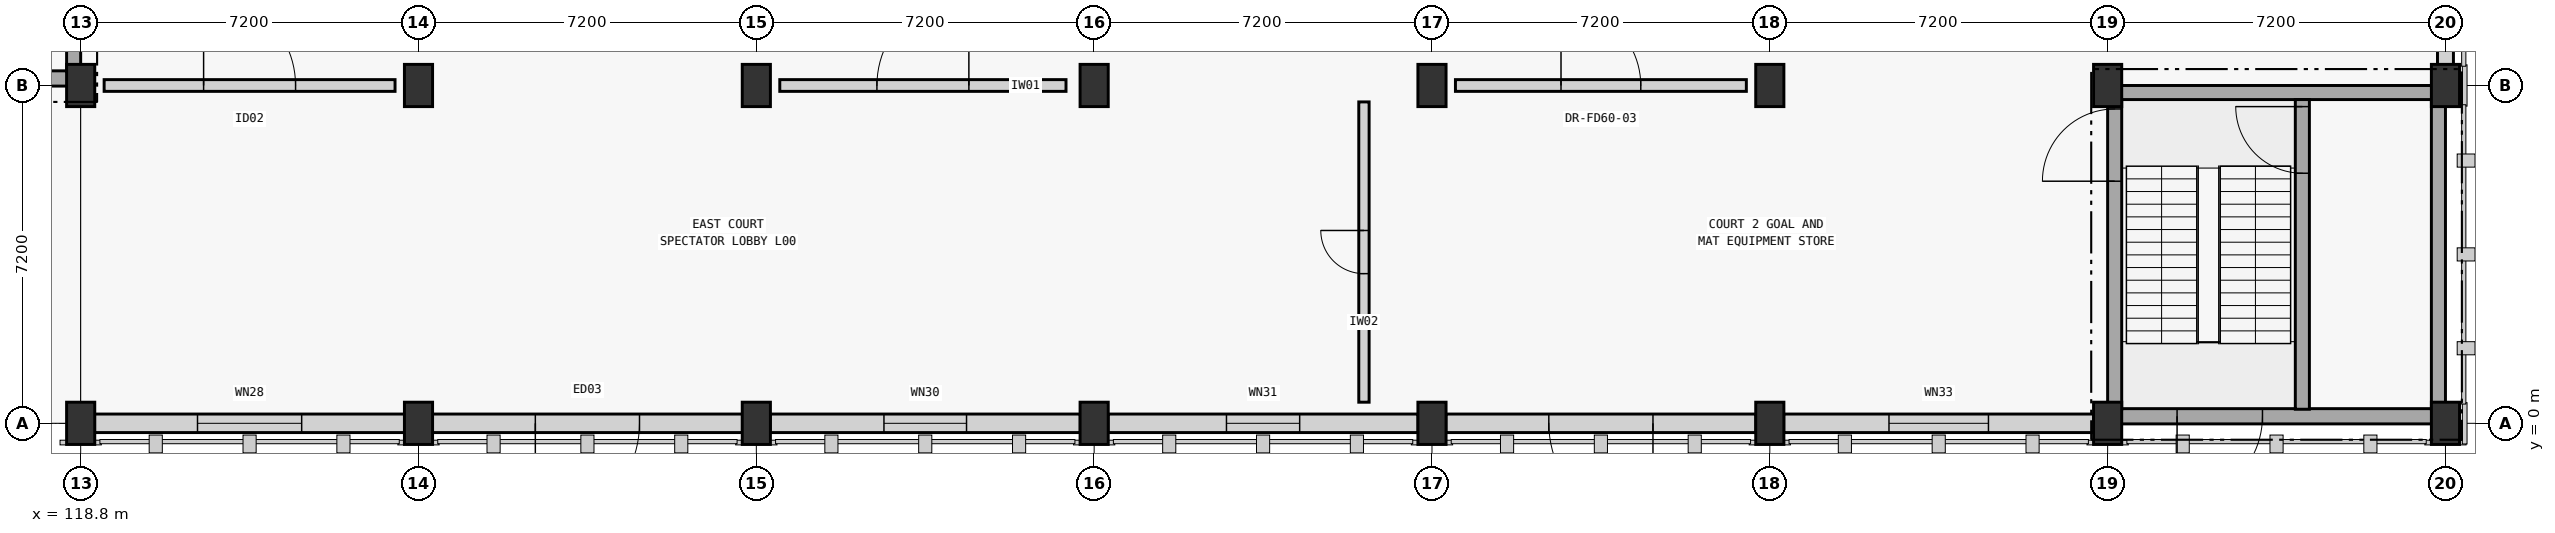
"""IFC4 building model, lengths in metres.
Left out: names, types, materials, properties, quantities, classifications, styles, units other than length and angle.
Written with IfcOpenShell. Run it as: python <this file> out.ifc"""

import sys

from ifc_helpers import new_model, si_unit, direction, frame, frame_2d, origin, origin_2d, place, context, subcontext, project, spatial, rectangle, extrude, element, fill, save


model = new_model("IFC4")
c1 = context("Model", 3, precision=1e-05, world=origin(), true_north=direction((0.0, 1.0)))
c2 = subcontext(c1, "Body", "Model", "MODEL_VIEW")
j1 = project(units=[si_unit("LENGTHUNIT", "METRE"), si_unit("PLANEANGLEUNIT", "RADIAN")], contexts=[c1])
p1 = place(None, origin())
s1 = spatial("IfcSite", under=j1, at=p1, CompositionType="ELEMENT")
p2 = place(p1, origin())
s2 = spatial("IfcBuilding", under=s1, at=p2, CompositionType="ELEMENT")
p3 = place(p2, origin())
s3 = spatial("IfcBuildingStorey", under=s2, at=p3, CompositionType="ELEMENT", Elevation=0.0)
for number, where, z_axis, x_axis in (
    (1, (118.8, 0.0, -0.3), (0.0, 0.0, 1.0), (1.0, 0.0, 0.0)),
    (2, (118.8, 7.2, -0.3), (0.0, 0.0, 1.0), (1.0, 0.0, 0.0)),
    (3, (126.0, 0.0, -0.3), (0.0, 0.0, 1.0), (1.0, 0.0, 0.0)),
    (4, (126.0, 7.2, -0.3), (0.0, 0.0, 1.0), (1.0, 0.0, 0.0)),
    (5, (133.2, 0.0, -0.3), (0.0, 0.0, 1.0), (1.0, 0.0, 0.0)),
    (6, (133.2, 7.2, -0.3), (0.0, 0.0, 1.0), (1.0, 0.0, 0.0)),
    (7, (140.4, 0.0, -0.3), (0.0, 0.0, 1.0), (1.0, 0.0, 0.0)),
    (8, (140.4, 7.2, -0.3), (0.0, 0.0, 1.0), (1.0, 0.0, 0.0)),
    (9, (147.6, 0.0, -0.3), (0.0, 0.0, 1.0), (1.0, 0.0, 0.0)),
    (10, (147.6, 7.2, -0.3), (0.0, 0.0, 1.0), (1.0, 0.0, 0.0)),
    (11, (154.8, 0.0, -0.3), (0.0, 0.0, 1.0), (1.0, 0.0, 0.0)),
    (12, (154.8, 7.2, -0.3), (0.0, 0.0, 1.0), (1.0, 0.0, 0.0)),
    (13, (162.0, 0.0, -0.3), (0.0, 0.0, 1.0), (1.0, 0.0, 0.0)),
    (14, (162.0, 7.2, -0.3), (0.0, 0.0, 1.0), (1.0, 0.0, 0.0)),
    (15, (169.2, 0.0, -0.3), (0.0, 0.0, 1.0), (1.0, 0.0, 0.0)),
    (16, (169.2, 7.2, -0.3), (0.0, 0.0, 1.0), (1.0, 0.0, 0.0)),
):
    element("IfcColumn", number, at=place(p3, frame(where, z_axis=z_axis, x_axis=x_axis)), inside=s3, PredefinedType="COLUMN", context=c2, shape_type="SweptSolid", body=[
        extrude(rectangle(XDim=0.6, YDim=0.9, at=origin_2d()), origin(), (0.0, 0.0, 1.0), 5.7),
    ])
p4 = place(p3, frame((118.8, 7.35, 0.0), z_axis=(0.0, 0.0, 1.0), x_axis=(-1.0, 0.0, 0.0)))
e17 = element("IfcWall", 17, at=p4, inside=s3, PredefinedType="SHEAR", context=c2, shape_type="SweptSolid", body=[
    extrude(rectangle(XDim=7.2, YDim=0.325, at=frame_2d((3.6, 0.0))), origin(), (0.0, 0.0, 1.0), 5.4),
])
p5 = place(p4, frame((3.9, 0.0, 0.0)))
e18 = element("IfcOpeningElement", 18, at=p5, cuts=e17, PredefinedType="OPENING", context=c2, shape_type="SweptSolid", body=[
    extrude(rectangle(XDim=1.82, YDim=2.22, at=frame_2d((0.91, 1.11))), frame((0.0, 0.163, 0.0), z_axis=(0.0, -1.0, 0.0), x_axis=(1.0, 0.0, 0.0)), (0.0, 0.0, 1.0), 0.325),
])
p6 = place(p3, frame((118.65, 17.7, 0.0), z_axis=(0.0, 0.0, 1.0), x_axis=(0.0, -1.0, 0.0)))
e19 = element("IfcWall", 19, at=p6, inside=s3, PredefinedType="SHEAR", context=c2, shape_type="SweptSolid", body=[
    extrude(rectangle(XDim=10.2, YDim=0.3, at=frame_2d((5.1, 0.0))), origin(), (0.0, 0.0, 1.0), 5.4),
])
p7 = place(p3, frame((169.2, 0.15, 0.0), z_axis=(0.0, 0.0, 1.0), x_axis=(-1.0, 0.0, 0.0)))
e20 = element("IfcWall", 20, at=p7, inside=s3, PredefinedType="SHEAR", context=c2, shape_type="SweptSolid", body=[
    extrude(rectangle(XDim=7.2, YDim=0.325, at=frame_2d((3.6, 0.0))), origin(), (0.0, 0.0, 1.0), 5.4),
])
p8 = place(p7, frame((3.9, 0.0, 0.0)))
e21 = element("IfcOpeningElement", 21, at=p8, cuts=e20, PredefinedType="OPENING", context=c2, shape_type="SweptSolid", body=[
    extrude(rectangle(XDim=1.82, YDim=2.22, at=frame_2d((0.91, 1.11))), frame((0.0, 0.163, 0.0), z_axis=(0.0, -1.0, 0.0), x_axis=(1.0, 0.0, 0.0)), (0.0, 0.0, 1.0), 0.325),
])
p9 = place(p3, frame((162.0, 7.05, 0.0), z_axis=(0.0, 0.0, 1.0), x_axis=(1.0, 0.0, 0.0)))
e22 = element("IfcWall", 22, at=p9, inside=s3, PredefinedType="SHEAR", context=c2, shape_type="SweptSolid", body=[
    extrude(rectangle(XDim=7.2, YDim=0.3, at=frame_2d((3.6, 0.0))), origin(), (0.0, 0.0, 1.0), 5.4),
])
p10 = place(p3, frame((162.15, 0.3, 0.0), z_axis=(0.0, 0.0, 1.0), x_axis=(0.0, 1.0, 0.0)))
e23 = element("IfcWall", 23, at=p10, inside=s3, PredefinedType="SHEAR", context=c2, shape_type="SweptSolid", body=[
    extrude(rectangle(XDim=6.6, YDim=0.3, at=frame_2d((3.3, 0.0))), origin(), (0.0, 0.0, 1.0), 5.4),
])
p11 = place(p10, frame((4.86, 0.0, 0.0)))
e24 = element("IfcOpeningElement", 24, at=p11, cuts=e23, PredefinedType="OPENING", context=c2, shape_type="SweptSolid", body=[
    extrude(rectangle(XDim=1.54, YDim=2.22, at=frame_2d((0.77, 1.11))), frame((0.0, 0.15, 0.0), z_axis=(0.0, -1.0, 0.0), x_axis=(1.0, 0.0, 0.0)), (0.0, 0.0, 1.0), 0.3),
])
p12 = place(p3, frame((169.05, 6.9, 0.0), z_axis=(0.0, 0.0, 1.0), x_axis=(0.0, -1.0, 0.0)))
e25 = element("IfcWall", 25, at=p12, inside=s3, PredefinedType="SHEAR", context=c2, shape_type="SweptSolid", body=[
    extrude(rectangle(XDim=6.6, YDim=0.3, at=frame_2d((3.3, 0.0))), origin(), (0.0, 0.0, 1.0), 5.4),
])
p13 = place(p3, frame((166.15, 0.3, 0.0), z_axis=(0.0, 0.0, 1.0), x_axis=(0.0, 1.0, 0.0)))
e26 = element("IfcWall", 26, at=p13, inside=s3, PredefinedType="SHEAR", context=c2, shape_type="SweptSolid", body=[
    extrude(rectangle(XDim=6.6, YDim=0.3, at=frame_2d((3.3, 0.0))), origin(), (0.0, 0.0, 1.0), 5.4),
])
p14 = place(p13, frame((5.03, 0.0, 0.0)))
e27 = element("IfcOpeningElement", 27, at=p14, cuts=e26, PredefinedType="OPENING", context=c2, shape_type="SweptSolid", body=[
    extrude(rectangle(XDim=1.42, YDim=2.2, at=frame_2d((0.71, 1.1))), frame((0.0, 0.15, 0.0), z_axis=(0.0, -1.0, 0.0), x_axis=(1.0, 0.0, 0.0)), (0.0, 0.0, 1.0), 0.3),
])
p15 = place(p3, frame((125.704, 0.0, 0.0), z_axis=(0.0, 0.0, 1.0), x_axis=(-1.0, 0.0, 0.0)))
e28 = element("IfcWall", 28, at=p15, inside=s3, PredefinedType="STANDARD", context=c2, shape_type="SweptSolid", body=[
    extrude(rectangle(XDim=6.608, YDim=0.395, at=frame_2d((3.304, 0.0))), origin(), (0.0, 0.0, 1.0), 4.515),
])
p16 = place(p15, frame((2.194, 0.0, 0.9)))
e29 = element("IfcOpeningElement", 29, at=p16, cuts=e28, PredefinedType="OPENING", context=c2, shape_type="SweptSolid", body=[
    extrude(rectangle(XDim=2.22, YDim=1.98, at=frame_2d((1.11, 0.99))), frame((0.0, 0.198, 0.0), z_axis=(0.0, -1.0, 0.0), x_axis=(1.0, 0.0, 0.0)), (0.0, 0.0, 1.0), 0.395),
])
p17 = place(p3, frame((132.904, 0.0, 0.0), z_axis=(0.0, 0.0, 1.0), x_axis=(-1.0, 0.0, 0.0)))
e30 = element("IfcWall", 30, at=p17, inside=s3, PredefinedType="STANDARD", context=c2, shape_type="SweptSolid", body=[
    extrude(rectangle(XDim=6.608, YDim=0.395, at=frame_2d((3.304, 0.0))), origin(), (0.0, 0.0, 1.0), 4.515),
])
p18 = place(p17, frame((2.194, 0.0, 0.0)))
e31 = element("IfcOpeningElement", 31, at=p18, cuts=e30, PredefinedType="OPENING", context=c2, shape_type="SweptSolid", body=[
    extrude(rectangle(XDim=2.22, YDim=2.42, at=frame_2d((1.11, 1.21))), frame((0.0, 0.198, 0.0), z_axis=(0.0, -1.0, 0.0), x_axis=(1.0, 0.0, 0.0)), (0.0, 0.0, 1.0), 0.395),
])
p19 = place(p3, frame((140.104, 0.0, 0.0), z_axis=(0.0, 0.0, 1.0), x_axis=(-1.0, 0.0, 0.0)))
e32 = element("IfcWall", 32, at=p19, inside=s3, PredefinedType="STANDARD", context=c2, shape_type="SweptSolid", body=[
    extrude(rectangle(XDim=6.608, YDim=0.395, at=frame_2d((3.304, 0.0))), origin(), (0.0, 0.0, 1.0), 4.515),
])
p20 = place(p19, frame((2.424, 0.0, 0.9)))
e33 = element("IfcOpeningElement", 33, at=p20, cuts=e32, PredefinedType="OPENING", context=c2, shape_type="SweptSolid", body=[
    extrude(rectangle(XDim=1.76, YDim=2.46, at=frame_2d((0.88, 1.23))), frame((0.0, 0.198, 0.0), z_axis=(0.0, -1.0, 0.0), x_axis=(1.0, 0.0, 0.0)), (0.0, 0.0, 1.0), 0.395),
])
p21 = place(p3, frame((147.304, 0.0, 0.0), z_axis=(0.0, 0.0, 1.0), x_axis=(-1.0, 0.0, 0.0)))
e34 = element("IfcWall", 34, at=p21, inside=s3, PredefinedType="STANDARD", context=c2, shape_type="SweptSolid", body=[
    extrude(rectangle(XDim=6.608, YDim=0.395, at=frame_2d((3.304, 0.0))), origin(), (0.0, 0.0, 1.0), 4.515),
])
p22 = place(p21, frame((2.524, 0.0, 0.9)))
e35 = element("IfcOpeningElement", 35, at=p22, cuts=e34, PredefinedType="OPENING", context=c2, shape_type="SweptSolid", body=[
    extrude(rectangle(XDim=1.56, YDim=2.16, at=frame_2d((0.78, 1.08))), frame((0.0, 0.198, 0.0), z_axis=(0.0, -1.0, 0.0), x_axis=(1.0, 0.0, 0.0)), (0.0, 0.0, 1.0), 0.395),
])
p23 = place(p3, frame((154.504, 0.0, 0.0), z_axis=(0.0, 0.0, 1.0), x_axis=(-1.0, 0.0, 0.0)))
e36 = element("IfcWall", 36, at=p23, inside=s3, PredefinedType="STANDARD", context=c2, shape_type="SweptSolid", body=[
    extrude(rectangle(XDim=6.608, YDim=0.395, at=frame_2d((3.304, 0.0))), origin(), (0.0, 0.0, 1.0), 4.515),
])
p24 = place(p23, frame((2.194, 0.0, 0.0)))
e37 = element("IfcOpeningElement", 37, at=p24, cuts=e36, PredefinedType="OPENING", context=c2, shape_type="SweptSolid", body=[
    extrude(rectangle(XDim=2.22, YDim=2.42, at=frame_2d((1.11, 1.21))), frame((0.0, 0.198, 0.0), z_axis=(0.0, -1.0, 0.0), x_axis=(1.0, 0.0, 0.0)), (0.0, 0.0, 1.0), 0.395),
])
p25 = place(p3, frame((161.704, 0.0, 0.0), z_axis=(0.0, 0.0, 1.0), x_axis=(-1.0, 0.0, 0.0)))
e38 = element("IfcWall", 38, at=p25, inside=s3, PredefinedType="STANDARD", context=c2, shape_type="SweptSolid", body=[
    extrude(rectangle(XDim=6.608, YDim=0.395, at=frame_2d((3.304, 0.0))), origin(), (0.0, 0.0, 1.0), 4.515),
])
p26 = place(p25, frame((2.244, 0.0, 0.9)))
e39 = element("IfcOpeningElement", 39, at=p26, cuts=e38, PredefinedType="OPENING", context=c2, shape_type="SweptSolid", body=[
    extrude(rectangle(XDim=2.12, YDim=1.56, at=frame_2d((1.06, 0.78))), frame((0.0, 0.198, 0.0), z_axis=(0.0, -1.0, 0.0), x_axis=(1.0, 0.0, 0.0)), (0.0, 0.0, 1.0), 0.395),
])
p27 = place(p3, frame((169.2, 17.554, 0.0), z_axis=(0.0, 0.0, 1.0), x_axis=(0.0, -1.0, 0.0)))
e40 = element("IfcWall", 40, at=p27, inside=s3, PredefinedType="STANDARD", context=c2, shape_type="SweptSolid", body=[
    extrude(rectangle(XDim=9.908, YDim=0.34, at=frame_2d((4.954, 0.0))), origin(), (0.0, 0.0, 1.0), 4.7),
])
p28 = place(p27, frame((3.714, 0.0, 1.1)))
e41 = element("IfcOpeningElement", 41, at=p28, cuts=e40, PredefinedType="OPENING", context=c2, shape_type="SweptSolid", body=[
    extrude(rectangle(XDim=2.48, YDim=1.74, at=frame_2d((1.24, 0.87))), frame((0.0, 0.17, 0.0), z_axis=(0.0, -1.0, 0.0), x_axis=(1.0, 0.0, 0.0)), (0.0, 0.0, 1.0), 0.34),
])
p29 = place(p3, frame((119.3, 7.2, 0.0), z_axis=(0.0, 0.0, 1.0), x_axis=(1.0, 0.0, 0.0)))
e42 = element("IfcWall", 42, at=p29, inside=s3, PredefinedType="STANDARD", context=c2, shape_type="SweptSolid", body=[
    extrude(rectangle(XDim=6.2, YDim=0.25, at=frame_2d((3.1, 0.0))), origin(), (0.0, 0.0, 1.0), 4.2),
])
p30 = place(p29, frame((2.12, 0.0, 0.0)))
e43 = element("IfcOpeningElement", 43, at=p30, cuts=e42, PredefinedType="OPENING", context=c2, shape_type="SweptSolid", body=[
    extrude(rectangle(XDim=1.96, YDim=2.36, at=frame_2d((0.98, 1.18))), frame((0.0, 0.125, 0.0), z_axis=(0.0, -1.0, 0.0), x_axis=(1.0, 0.0, 0.0)), (0.0, 0.0, 1.0), 0.25),
])
p31 = place(p3, frame((133.7, 7.2, 0.0), z_axis=(0.0, 0.0, 1.0), x_axis=(1.0, 0.0, 0.0)))
e44 = element("IfcWall", 44, at=p31, inside=s3, PredefinedType="STANDARD", context=c2, shape_type="SweptSolid", body=[
    extrude(rectangle(XDim=6.1, YDim=0.25, at=frame_2d((3.05, 0.0))), origin(), (0.0, 0.0, 1.0), 4.2),
])
p32 = place(p31, frame((2.07, 0.0, 0.0)))
e45 = element("IfcOpeningElement", 45, at=p32, cuts=e44, PredefinedType="OPENING", context=c2, shape_type="SweptSolid", body=[
    extrude(rectangle(XDim=1.96, YDim=2.36, at=frame_2d((0.98, 1.18))), frame((0.0, 0.125, 0.0), z_axis=(0.0, -1.0, 0.0), x_axis=(1.0, 0.0, 0.0)), (0.0, 0.0, 1.0), 0.25),
])
p33 = place(p3, frame((148.1, 7.2, 0.0), z_axis=(0.0, 0.0, 1.0), x_axis=(1.0, 0.0, 0.0)))
e46 = element("IfcWall", 46, at=p33, inside=s3, PredefinedType="STANDARD", context=c2, shape_type="SweptSolid", body=[
    extrude(rectangle(XDim=6.2, YDim=0.25, at=frame_2d((3.1, 0.0))), origin(), (0.0, 0.0, 1.0), 4.2),
])
p34 = place(p33, frame((2.25, 0.0, 0.0)))
e47 = element("IfcOpeningElement", 47, at=p34, cuts=e46, PredefinedType="OPENING", context=c2, shape_type="SweptSolid", body=[
    extrude(rectangle(XDim=1.7, YDim=2.26, at=frame_2d((0.85, 1.13))), frame((0.0, 0.125, 0.0), z_axis=(0.0, -1.0, 0.0), x_axis=(1.0, 0.0, 0.0)), (0.0, 0.0, 1.0), 0.25),
])
p35 = place(p3, frame((146.15, 0.45, 0.0), z_axis=(0.0, 0.0, 1.0), x_axis=(0.0, 1.0, 0.0)))
e48 = element("IfcWall", 48, at=p35, inside=s3, PredefinedType="STANDARD", context=c2, shape_type="SweptSolid", body=[
    extrude(rectangle(XDim=6.4, YDim=0.22, at=frame_2d((3.2, 0.0))), origin(), (0.0, 0.0, 1.0), 4.2),
])
p36 = place(p35, frame((2.74, 0.0, 0.0)))
e49 = element("IfcOpeningElement", 49, at=p36, cuts=e48, PredefinedType="OPENING", context=c2, shape_type="SweptSolid", body=[
    extrude(rectangle(XDim=0.92, YDim=2.12, at=frame_2d((0.46, 1.06))), frame((0.0, 0.11, 0.0), z_axis=(0.0, -1.0, 0.0), x_axis=(1.0, 0.0, 0.0)), (0.0, 0.0, 1.0), 0.22),
])
p37 = place(p8, origin())
e50 = element("IfcDoor", 50, at=p37, inside=s3, OperationType="SINGLE_SWING_RIGHT", PredefinedType="DOOR", context=c2, shape_type="SweptSolid", body=[
    extrude(rectangle(XDim=1.82, YDim=2.22, at=frame_2d((0.91, 1.11))), frame((0.0, 0.025, 0.0), z_axis=(0.0, -1.0, 0.0), x_axis=(1.0, 0.0, 0.0)), (0.0, 0.0, 1.0), 0.05),
])
fill(e21, e50)
p38 = place(p16, origin())
e51 = element("IfcWindow", 51, at=p38, inside=s3, PartitioningType="SINGLE_PANEL", PredefinedType="WINDOW", context=c2, shape_type="SweptSolid", body=[
    extrude(rectangle(XDim=2.22, YDim=1.98, at=frame_2d((1.11, 0.99))), frame((0.0, 0.03, 0.0), z_axis=(0.0, -1.0, 0.0), x_axis=(1.0, 0.0, 0.0)), (0.0, 0.0, 1.0), 0.06),
])
fill(e29, e51)
p39 = place(p18, origin())
e52 = element("IfcDoor", 52, at=p39, inside=s3, OperationType="SINGLE_SWING_RIGHT", PredefinedType="DOOR", context=c2, shape_type="SweptSolid", body=[
    extrude(rectangle(XDim=2.22, YDim=2.42, at=frame_2d((1.11, 1.21))), frame((0.0, 0.025, 0.0), z_axis=(0.0, -1.0, 0.0), x_axis=(1.0, 0.0, 0.0)), (0.0, 0.0, 1.0), 0.05),
])
fill(e31, e52)
p40 = place(p20, origin())
e53 = element("IfcWindow", 53, at=p40, inside=s3, PartitioningType="SINGLE_PANEL", PredefinedType="WINDOW", context=c2, shape_type="SweptSolid", body=[
    extrude(rectangle(XDim=1.76, YDim=2.46, at=frame_2d((0.88, 1.23))), frame((0.0, 0.03, 0.0), z_axis=(0.0, -1.0, 0.0), x_axis=(1.0, 0.0, 0.0)), (0.0, 0.0, 1.0), 0.06),
])
fill(e33, e53)
p41 = place(p22, origin())
e54 = element("IfcWindow", 54, at=p41, inside=s3, PartitioningType="SINGLE_PANEL", PredefinedType="WINDOW", context=c2, shape_type="SweptSolid", body=[
    extrude(rectangle(XDim=1.56, YDim=2.16, at=frame_2d((0.78, 1.08))), frame((0.0, 0.03, 0.0), z_axis=(0.0, -1.0, 0.0), x_axis=(1.0, 0.0, 0.0)), (0.0, 0.0, 1.0), 0.06),
])
fill(e35, e54)
p42 = place(p24, origin())
e55 = element("IfcDoor", 55, at=p42, inside=s3, OperationType="SINGLE_SWING_LEFT", PredefinedType="DOOR", context=c2, shape_type="SweptSolid", body=[
    extrude(rectangle(XDim=2.22, YDim=2.42, at=frame_2d((1.11, 1.21))), frame((0.0, 0.025, 0.0), z_axis=(0.0, -1.0, 0.0), x_axis=(1.0, 0.0, 0.0)), (0.0, 0.0, 1.0), 0.05),
])
fill(e37, e55)
p43 = place(p26, origin())
e56 = element("IfcWindow", 56, at=p43, inside=s3, PartitioningType="SINGLE_PANEL", PredefinedType="WINDOW", context=c2, shape_type="SweptSolid", body=[
    extrude(rectangle(XDim=2.12, YDim=1.56, at=frame_2d((1.06, 0.78))), frame((0.0, 0.03, 0.0), z_axis=(0.0, -1.0, 0.0), x_axis=(1.0, 0.0, 0.0)), (0.0, 0.0, 1.0), 0.06),
])
fill(e39, e56)
p44 = place(p14, origin())
e57 = element("IfcDoor", 57, at=p44, inside=s3, OperationType="SINGLE_SWING_RIGHT", PredefinedType="DOOR", context=c2, shape_type="SweptSolid", body=[
    extrude(rectangle(XDim=1.42, YDim=2.2, at=frame_2d((0.71, 1.1))), frame((0.0, 0.025, 0.0), z_axis=(0.0, -1.0, 0.0), x_axis=(1.0, 0.0, 0.0)), (0.0, 0.0, 1.0), 0.05),
])
fill(e27, e57)
p45 = place(p11, origin())
e58 = element("IfcDoor", 58, at=p45, inside=s3, OperationType="SINGLE_SWING_LEFT", PredefinedType="DOOR", context=c2, shape_type="SweptSolid", body=[
    extrude(rectangle(XDim=1.54, YDim=2.22, at=frame_2d((0.77, 1.11))), frame((0.0, 0.025, 0.0), z_axis=(0.0, -1.0, 0.0), x_axis=(1.0, 0.0, 0.0)), (0.0, 0.0, 1.0), 0.05),
])
fill(e24, e58)
p46 = place(p30, origin())
e59 = element("IfcDoor", 59, at=p46, inside=s3, OperationType="SINGLE_SWING_LEFT", PredefinedType="DOOR", context=c2, shape_type="SweptSolid", body=[
    extrude(rectangle(XDim=1.96, YDim=2.36, at=frame_2d((0.98, 1.18))), frame((0.0, 0.025, 0.0), z_axis=(0.0, -1.0, 0.0), x_axis=(1.0, 0.0, 0.0)), (0.0, 0.0, 1.0), 0.05),
])
fill(e43, e59)
p47 = place(p32, origin())
e60 = element("IfcDoor", 60, at=p47, inside=s3, OperationType="SINGLE_SWING_RIGHT", PredefinedType="DOOR", context=c2, shape_type="SweptSolid", body=[
    extrude(rectangle(XDim=1.96, YDim=2.36, at=frame_2d((0.98, 1.18))), frame((0.0, 0.025, 0.0), z_axis=(0.0, -1.0, 0.0), x_axis=(1.0, 0.0, 0.0)), (0.0, 0.0, 1.0), 0.05),
])
fill(e45, e60)
p48 = place(p34, origin())
e61 = element("IfcDoor", 61, at=p48, inside=s3, OperationType="SINGLE_SWING_LEFT", PredefinedType="DOOR", context=c2, shape_type="SweptSolid", body=[
    extrude(rectangle(XDim=1.7, YDim=2.26, at=frame_2d((0.85, 1.13))), frame((0.0, 0.025, 0.0), z_axis=(0.0, -1.0, 0.0), x_axis=(1.0, 0.0, 0.0)), (0.0, 0.0, 1.0), 0.05),
])
fill(e47, e61)
p49 = place(p36, origin())
e62 = element("IfcDoor", 62, at=p49, inside=s3, OperationType="SINGLE_SWING_RIGHT", PredefinedType="DOOR", context=c2, shape_type="SweptSolid", body=[
    extrude(rectangle(XDim=0.92, YDim=2.12, at=frame_2d((0.46, 1.06))), frame((0.0, 0.025, 0.0), z_axis=(0.0, -1.0, 0.0), x_axis=(1.0, 0.0, 0.0)), (0.0, 0.0, 1.0), 0.05),
])
fill(e49, e62)
save(model, sys.argv[1])
